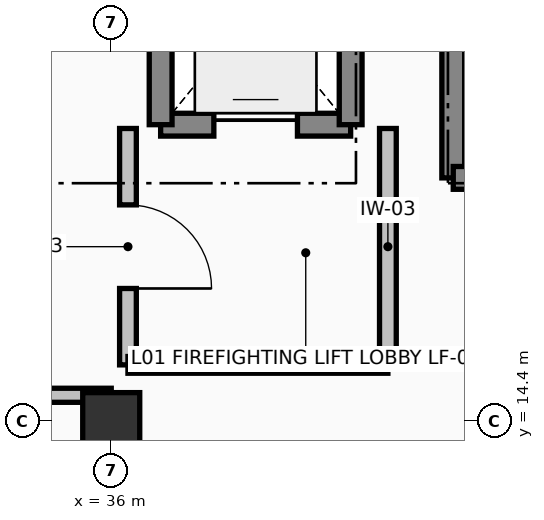
"""IFC4 building model, lengths in metres.
Left out: names, types, materials, properties, quantities, classifications, styles, units other than length and angle.
Written with IfcOpenShell. Run it as: python <this file> out.ifc"""

import sys

from ifc_helpers import new_model, si_unit, direction, frame, frame_2d, origin, origin_2d, place, context, subcontext, project, spatial, rectangle, extrude, element, fill, save


model = new_model("IFC4")
c1 = context("Model", 3, precision=1e-05, world=origin(), true_north=direction((0.0, 1.0)))
c2 = subcontext(c1, "Body", "Model", "MODEL_VIEW")
j1 = project(units=[si_unit("LENGTHUNIT", "METRE"), si_unit("PLANEANGLEUNIT", "RADIAN")], contexts=[c1])
p1 = place(None, origin())
s1 = spatial("IfcSite", under=j1, at=p1, CompositionType="ELEMENT")
p2 = place(p1, origin())
s2 = spatial("IfcBuilding", under=s1, at=p2, CompositionType="ELEMENT")
p3 = place(p2, frame((0.0, 0.0, 5.76)))
s3 = spatial("IfcBuildingStorey", under=s2, at=p3, CompositionType="ELEMENT", Elevation=5.76)
p4 = place(p3, frame((36.0, 14.4, 0.0), z_axis=(0.0, 0.0, 1.0), x_axis=(1.0, 0.0, 0.0)))
e1 = element("IfcColumn", 1, at=p4, inside=s3, PredefinedType="COLUMN", context=c2, shape_type="SweptSolid", body=[
    extrude(rectangle(XDim=0.75, YDim=0.75, at=origin_2d()), origin(), (0.0, 0.0, 1.0), 4.08),
])
p5 = place(p3, frame((40.5, 17.6, 0.0), z_axis=(0.0, 0.0, 1.0), x_axis=(0.0, 1.0, 0.0)))
e2 = element("IfcWall", 2, at=p5, inside=s3, PredefinedType="SHEAR", context=c2, shape_type="SweptSolid", body=[
    extrude(rectangle(XDim=3.8, YDim=0.3, at=frame_2d((1.9, 0.0))), origin(), (0.0, 0.0, 1.0), 4.08),
])
p6 = place(p3, frame((40.5, 17.6, 0.0), z_axis=(0.0, 0.0, 1.0), x_axis=(1.0, 0.0, 0.0)))
e3 = element("IfcWall", 3, at=p6, inside=s3, PredefinedType="SHEAR", context=c2, shape_type="SweptSolid", body=[
    extrude(rectangle(XDim=9.0, YDim=0.3, at=frame_2d((4.5, 0.0))), origin(), (0.0, 0.0, 1.0), 4.08),
])
p7 = place(p6, frame((0.35, 0.0, 0.0)))
e4 = element("IfcOpeningElement", 4, at=p7, cuts=e3, PredefinedType="OPENING", context=c2, shape_type="SweptSolid", body=[
    extrude(rectangle(XDim=1.15, YDim=2.15, at=frame_2d((0.575, 1.075))), frame((0.0, 0.16, 0.0), z_axis=(0.0, -1.0, 0.0), x_axis=(1.0, 0.0, 0.0)), (0.0, 0.0, 1.0), 0.32),
])
p8 = place(p3, frame((36.65, 18.3, 0.0), z_axis=(0.0, 0.0, 1.0), x_axis=(1.0, 0.0, 0.0)))
e5 = element("IfcWall", 5, at=p8, inside=s3, PredefinedType="SHEAR", context=c2, shape_type="SweptSolid", body=[
    extrude(rectangle(XDim=2.5, YDim=0.3, at=frame_2d((1.25, 0.0))), origin(), (0.0, 0.0, 1.0), 4.08),
])
p9 = place(p8, frame((0.7, 0.0, 0.0)))
e6 = element("IfcOpeningElement", 6, at=p9, cuts=e5, PredefinedType="OPENING", context=c2, shape_type="SweptSolid", body=[
    extrude(rectangle(XDim=1.1, YDim=2.1, at=frame_2d((0.55, 1.05))), frame((0.0, 0.16, 0.0), z_axis=(0.0, -1.0, 0.0), x_axis=(1.0, 0.0, 0.0)), (0.0, 0.0, 1.0), 0.32),
])
for number, where, z_axis, x_axis in (
    (7, (36.65, 18.3, 0.0), (0.0, 0.0, 1.0), (0.0, 1.0, 0.0)),
    (8, (39.15, 18.3, 0.0), (0.0, 0.0, 1.0), (0.0, 1.0, 0.0)),
):
    element("IfcWall", number, at=place(p3, frame(where, z_axis=z_axis, x_axis=x_axis)), inside=s3, PredefinedType="SHEAR", context=c2, shape_type="SweptSolid", body=[
        extrude(rectangle(XDim=3.0, YDim=0.3, at=frame_2d((1.5, 0.0))), origin(), (0.0, 0.0, 1.0), 4.08),
    ])
p10 = place(p3, frame((36.22, 18.25, 0.0), z_axis=(0.0, 0.0, 1.0), x_axis=(0.0, -1.0, 0.0)))
e9 = element("IfcWall", 9, at=p10, inside=s3, PredefinedType="SOLIDWALL", context=c2, shape_type="SweptSolid", body=[
    extrude(rectangle(XDim=3.11, YDim=0.22, at=frame_2d((1.555, 0.0))), origin(), (0.0, 0.0, 1.0), 3.06),
])
p11 = place(p10, frame((1.005, 0.0, 0.0)))
e10 = element("IfcOpeningElement", 10, at=p11, cuts=e9, PredefinedType="OPENING", context=c2, shape_type="SweptSolid", body=[
    extrude(rectangle(XDim=1.1, YDim=2.15, at=frame_2d((0.55, 1.075))), frame((0.0, 0.12, 0.0), z_axis=(0.0, -1.0, 0.0), x_axis=(1.0, 0.0, 0.0)), (0.0, 0.0, 1.0), 0.24),
])
p12 = place(p3, frame((36.22, 15.14, 0.0), z_axis=(0.0, 0.0, 1.0), x_axis=(1.0, 0.0, 0.0)))
e11 = element("IfcWall", 11, at=p12, inside=s3, PredefinedType="SOLIDWALL", context=c2, shape_type="SweptSolid", body=[
    extrude(rectangle(XDim=3.42, YDim=0.22, at=frame_2d((1.71, 0.0))), origin(), (0.0, 0.0, 1.0), 3.82),
])
p13 = place(p3, frame((39.64, 15.14, 0.0), z_axis=(0.0, 0.0, 1.0), x_axis=(0.0, 1.0, 0.0)))
e12 = element("IfcWall", 12, at=p13, inside=s3, PredefinedType="SOLIDWALL", context=c2, shape_type="SweptSolid", body=[
    extrude(rectangle(XDim=3.11, YDim=0.22, at=frame_2d((1.555, 0.0))), origin(), (0.0, 0.0, 1.0), 3.82),
])
p14 = place(p3, frame((36.0, 0.22, 0.0), z_axis=(0.0, 0.0, 1.0), x_axis=(0.0, 1.0, 0.0)))
e13 = element("IfcWall", 13, at=p14, inside=s3, PredefinedType="PARTITIONING", context=c2, shape_type="SweptSolid", body=[
    extrude(rectangle(XDim=14.52, YDim=0.185, at=frame_2d((7.26, 0.0))), origin(), (0.0, 0.0, 1.0), 2.86),
])
p15 = place(p3, frame((36.0, 14.74, 0.0), z_axis=(0.0, 0.0, 1.0), x_axis=(-1.0, 0.0, 0.0)))
e14 = element("IfcWall", 14, at=p15, inside=s3, PredefinedType="PARTITIONING", context=c2, shape_type="SweptSolid", body=[
    extrude(rectangle(XDim=32.0, YDim=0.185, at=frame_2d((16.0, 0.0))), origin(), (0.0, 0.0, 1.0), 3.01),
])
p16 = place(p15, frame((15.36, 0.0, 0.0)))
e15 = element("IfcOpeningElement", 15, at=p16, cuts=e14, PredefinedType="OPENING", context=c2, shape_type="SweptSolid", body=[
    extrude(rectangle(XDim=0.98, YDim=2.12, at=frame_2d((0.49, 1.06))), frame((0.0, 0.103, 0.0), z_axis=(0.0, -1.0, 0.0), x_axis=(1.0, 0.0, 0.0)), (0.0, 0.0, 1.0), 0.205),
])
p17 = place(p9, origin())
e16 = element("IfcDoor", 16, at=p17, inside=s3, OperationType="SLIDING_TO_LEFT", PredefinedType="DOOR", context=c2, shape_type="SweptSolid", body=[
    extrude(rectangle(XDim=1.1, YDim=2.1, at=frame_2d((0.55, 1.05))), frame((0.0, 0.025, 0.0), z_axis=(0.0, -1.0, 0.0), x_axis=(1.0, 0.0, 0.0)), (0.0, 0.0, 1.0), 0.05),
])
fill(e6, e16)
p18 = place(p11, origin())
e17 = element("IfcDoor", 17, at=p18, inside=s3, OperationType="SINGLE_SWING_RIGHT", PredefinedType="DOOR", context=c2, shape_type="SweptSolid", body=[
    extrude(rectangle(XDim=1.1, YDim=2.15, at=frame_2d((0.55, 1.075))), frame((0.0, 0.025, 0.0), z_axis=(0.0, -1.0, 0.0), x_axis=(1.0, 0.0, 0.0)), (0.0, 0.0, 1.0), 0.05),
])
fill(e10, e17)
save(model, sys.argv[1])
